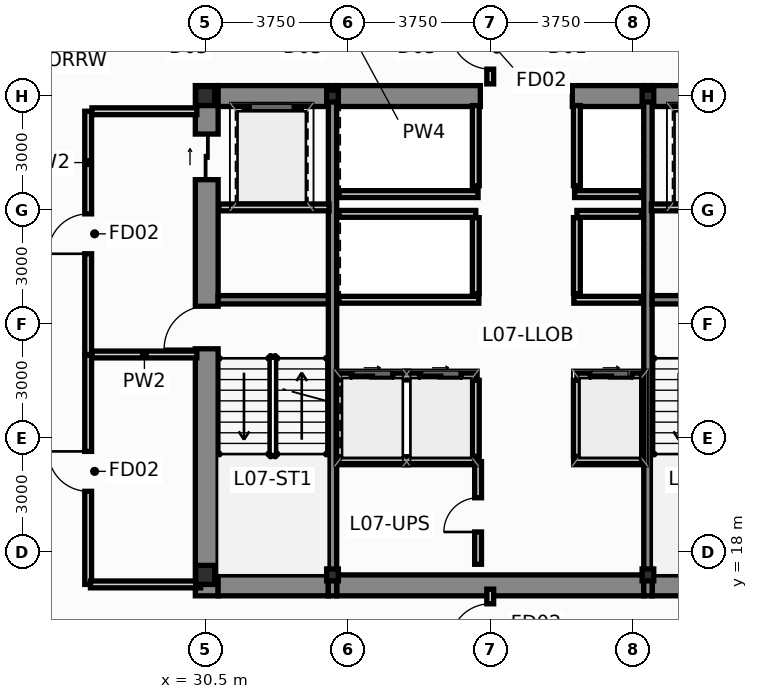
"""IFC4 building model, lengths in metres.
Left out: names, types, materials, properties, quantities, classifications, styles, units other than length and angle.
Written with IfcOpenShell. Run it as: python <this file> out.ifc"""

import sys

from ifc_helpers import new_model, si_unit, direction, frame, frame_2d, origin, origin_2d, place, context, subcontext, project, spatial, rectangle, i_section, extrude, source, transform, mapped, element, fill, save


model = new_model("IFC4")
c1 = context("Model", 3, precision=1e-05, world=origin(), true_north=direction((0.0, 1.0)))
c2 = subcontext(c1, "Body", "Model", "MODEL_VIEW")
j1 = project(units=[si_unit("LENGTHUNIT", "METRE"), si_unit("PLANEANGLEUNIT", "RADIAN")], contexts=[c1])
p1 = place(None, origin())
s1 = spatial("IfcSite", under=j1, at=p1, CompositionType="ELEMENT")
p2 = place(p1, origin())
s2 = spatial("IfcBuilding", under=s1, at=p2, CompositionType="ELEMENT")
p3 = place(p2, frame((0.0, 0.0, 31.25)))
s3 = spatial("IfcBuildingStorey", under=s2, at=p3, CompositionType="ELEMENT", Elevation=31.25)
m1 = source(origin(), c2, "Body", "SweptSolid", [
    extrude(i_section(OverallWidth=0.5, OverallDepth=0.5, WebThickness=0.028, FlangeThickness=0.04, at=origin_2d()), origin(), (0.0, 0.0, 1.0), 3.65),
])
for number, where, z_axis, x_axis in (
    (1, (30.5, 17.4, 0.0), (0.0, 0.0, 1.0), (1.0, 0.0, 0.0)),
    (2, (30.5, 30.0, 0.0), (0.0, 0.0, 1.0), (1.0, 0.0, 0.0)),
):
    element("IfcColumn", number, at=place(p3, frame(where, z_axis=z_axis, x_axis=x_axis)), inside=s3, PredefinedType="COLUMN", context=c2, shape_type="MappedRepresentation", body=[
        mapped(m1, transform((0.0, 0.0, 0.0), scale=1.0)),
    ])
m2 = source(origin(), c2, "Body", "SweptSolid", [
    extrude(i_section(OverallWidth=0.307, OverallDepth=0.315, WebThickness=0.012, FlangeThickness=0.019, at=origin_2d()), origin(), (0.0, 0.0, 1.0), 3.65),
])
for number, where, z_axis, x_axis in (
    (3, (33.85, 17.4, 0.0), (0.0, 0.0, 1.0), (1.0, 0.0, 0.0)),
    (4, (42.15, 17.4, 0.0), (0.0, 0.0, 1.0), (1.0, 0.0, 0.0)),
    (5, (33.85, 30.0, 0.0), (0.0, 0.0, 1.0), (1.0, 0.0, 0.0)),
    (6, (42.15, 30.0, 0.0), (0.0, 0.0, 1.0), (1.0, 0.0, 0.0)),
):
    element("IfcColumn", number, at=place(p3, frame(where, z_axis=z_axis, x_axis=x_axis)), inside=s3, PredefinedType="COLUMN", context=c2, shape_type="MappedRepresentation", body=[
        mapped(m2, transform((0.0, 0.0, 0.0), scale=1.0)),
    ])
p4 = place(p3, frame((30.54, 16.85, 0.0), z_axis=(0.0, 0.0, 1.0), x_axis=(0.0, 1.0, 0.0)))
e7 = element("IfcWall", 7, at=p4, inside=s3, PredefinedType="SHEAR", context=c2, shape_type="SweptSolid", body=[
    extrude(rectangle(XDim=13.425, YDim=0.6, at=frame_2d((6.712, 0.0))), origin(), (0.0, 0.0, 1.0), 3.65),
])
p5 = place(p4, frame((6.5, 0.0, 0.0)))
e8 = element("IfcOpeningElement", 8, at=p5, cuts=e7, PredefinedType="OPENING", context=c2, shape_type="SweptSolid", body=[
    extrude(rectangle(XDim=1.12, YDim=2.15, at=frame_2d((0.56, 1.075))), frame((0.0, 0.312, 0.0), z_axis=(0.0, -1.0, 0.0), x_axis=(1.0, 0.0, 0.0)), (0.0, 0.0, 1.0), 0.624),
])
p6 = place(p4, frame((10.95, 0.0, 0.0)))
e9 = element("IfcOpeningElement", 9, at=p6, cuts=e7, PredefinedType="OPENING", context=c2, shape_type="SweptSolid", body=[
    extrude(rectangle(XDim=1.2, YDim=2.2, at=frame_2d((0.6, 1.1))), frame((0.0, 0.312, 0.0), z_axis=(0.0, -1.0, 0.0), x_axis=(1.0, 0.0, 0.0)), (0.0, 0.0, 1.0), 0.624),
])
p7 = place(p3, frame((30.84, 17.125, 0.0), z_axis=(0.0, 0.0, 1.0), x_axis=(1.0, 0.0, 0.0)))
e10 = element("IfcWall", 10, at=p7, inside=s3, PredefinedType="SHEAR", context=c2, shape_type="SweptSolid", body=[
    extrude(rectangle(XDim=2.9, YDim=0.55, at=frame_2d((1.45, 0.0))), origin(), (0.0, 0.0, 1.0), 3.65),
])
p8 = place(p3, frame((33.96, 17.125, 0.0), z_axis=(0.0, 0.0, 1.0), x_axis=(1.0, 0.0, 0.0)))
e11 = element("IfcWall", 11, at=p8, inside=s3, PredefinedType="SHEAR", context=c2, shape_type="SweptSolid", body=[
    extrude(rectangle(XDim=8.08, YDim=0.55, at=frame_2d((4.04, 0.0))), origin(), (0.0, 0.0, 1.0), 3.65),
])
for number, where, z_axis, x_axis in (
    (12, (42.26, 17.125, 0.0), (0.0, 0.0, 1.0), (1.0, 0.0, 0.0)),
    (13, (30.84, 30.0, 0.0), (0.0, 0.0, 1.0), (1.0, 0.0, 0.0)),
):
    element("IfcWall", number, at=place(p3, frame(where, z_axis=z_axis, x_axis=x_axis)), inside=s3, PredefinedType="SHEAR", context=c2, shape_type="SweptSolid", body=[
        extrude(rectangle(XDim=2.9, YDim=0.55, at=frame_2d((1.45, 0.0))), origin(), (0.0, 0.0, 1.0), 3.65),
    ])
p9 = place(p3, frame((33.96, 30.0, 0.0), z_axis=(0.0, 0.0, 1.0), x_axis=(1.0, 0.0, 0.0)))
e14 = element("IfcWall", 14, at=p9, inside=s3, PredefinedType="SHEAR", context=c2, shape_type="SweptSolid", body=[
    extrude(rectangle(XDim=3.78, YDim=0.55, at=frame_2d((1.89, 0.0))), origin(), (0.0, 0.0, 1.0), 3.65),
])
p10 = place(p3, frame((40.16, 30.0, 0.0), z_axis=(0.0, 0.0, 1.0), x_axis=(1.0, 0.0, 0.0)))
e15 = element("IfcWall", 15, at=p10, inside=s3, PredefinedType="SHEAR", context=c2, shape_type="SweptSolid", body=[
    extrude(rectangle(XDim=1.88, YDim=0.55, at=frame_2d((0.94, 0.0))), origin(), (0.0, 0.0, 1.0), 3.65),
])
p11 = place(p3, frame((42.26, 30.0, 0.0), z_axis=(0.0, 0.0, 1.0), x_axis=(1.0, 0.0, 0.0)))
e16 = element("IfcWall", 16, at=p11, inside=s3, PredefinedType="SHEAR", context=c2, shape_type="SweptSolid", body=[
    extrude(rectangle(XDim=2.9, YDim=0.55, at=frame_2d((1.45, 0.0))), origin(), (0.0, 0.0, 1.0), 3.65),
])
for number, where, z_axis, x_axis in (
    (17, (33.85, 16.85, 0.0), (0.0, 0.0, 1.0), (0.0, 1.0, 0.0)),
    (18, (42.15, 16.85, 0.0), (0.0, 0.0, 1.0), (0.0, 1.0, 0.0)),
):
    element("IfcWall", number, at=place(p3, frame(where, z_axis=z_axis, x_axis=x_axis)), inside=s3, PredefinedType="SHEAR", context=c2, shape_type="SweptSolid", body=[
        extrude(rectangle(XDim=13.425, YDim=0.22, at=frame_2d((6.712, 0.0))), origin(), (0.0, 0.0, 1.0), 3.65),
    ])
for number, where, z_axis, x_axis in (
    (19, (30.84, 24.64, 0.0), (0.0, 0.0, 1.0), (1.0, 0.0, 0.0)),
    (20, (42.26, 24.64, 0.0), (0.0, 0.0, 1.0), (1.0, 0.0, 0.0)),
):
    element("IfcWall", number, at=place(p3, frame(where, z_axis=z_axis, x_axis=x_axis)), inside=s3, PredefinedType="SHEAR", context=c2, shape_type="SweptSolid", body=[
        extrude(rectangle(XDim=2.9, YDim=0.22, at=frame_2d((1.45, 0.0))), origin(), (0.0, 0.0, 1.0), 3.65),
    ])
p12 = place(p3, frame((34.02, 22.62, 0.0), z_axis=(0.0, 0.0, 1.0), x_axis=(1.0, 0.0, 0.0)))
e21 = element("IfcWall", 21, at=p12, inside=s3, PredefinedType="PARTITIONING", context=c2, shape_type="SweptSolid", body=[
    extrude(rectangle(XDim=3.6, YDim=0.18, at=frame_2d((1.8, 0.0))), origin(), (0.0, 0.0, 1.0), 3.4),
])
p13 = place(p12, frame((0.32, 0.0, 0.0)))
e22 = element("IfcOpeningElement", 22, at=p13, cuts=e21, PredefinedType="OPENING", context=c2, shape_type="SweptSolid", body=[
    extrude(rectangle(XDim=1.1, YDim=2.2, at=frame_2d((0.55, 1.1))), frame((0.0, 0.102, 0.0), z_axis=(0.0, -1.0, 0.0), x_axis=(1.0, 0.0, 0.0)), (0.0, 0.0, 1.0), 0.204),
])
p14 = place(p12, frame((2.12, 0.0, 0.0)))
e23 = element("IfcOpeningElement", 23, at=p14, cuts=e21, PredefinedType="OPENING", context=c2, shape_type="SweptSolid", body=[
    extrude(rectangle(XDim=1.1, YDim=2.2, at=frame_2d((0.55, 1.1))), frame((0.0, 0.102, 0.0), z_axis=(0.0, -1.0, 0.0), x_axis=(1.0, 0.0, 0.0)), (0.0, 0.0, 1.0), 0.204),
])
p15 = place(p3, frame((40.28, 22.62, 0.0), z_axis=(0.0, 0.0, 1.0), x_axis=(1.0, 0.0, 0.0)))
e24 = element("IfcWall", 24, at=p15, inside=s3, PredefinedType="PARTITIONING", context=c2, shape_type="SweptSolid", body=[
    extrude(rectangle(XDim=1.7, YDim=0.18, at=frame_2d((0.85, 0.0))), origin(), (0.0, 0.0, 1.0), 3.4),
])
p16 = place(p15, frame((0.35, 0.0, 0.0)))
e25 = element("IfcOpeningElement", 25, at=p16, cuts=e24, PredefinedType="OPENING", context=c2, shape_type="SweptSolid", body=[
    extrude(rectangle(XDim=1.1, YDim=2.2, at=frame_2d((0.55, 1.1))), frame((0.0, 0.102, 0.0), z_axis=(0.0, -1.0, 0.0), x_axis=(1.0, 0.0, 0.0)), (0.0, 0.0, 1.0), 0.204),
])
for number, where, z_axis, x_axis in (
    (26, (37.62, 20.52, 0.0), (0.0, 0.0, 1.0), (0.0, 1.0, 0.0)),
    (27, (40.28, 20.52, 0.0), (0.0, 0.0, 1.0), (0.0, 1.0, 0.0)),
):
    element("IfcWall", number, at=place(p3, frame(where, z_axis=z_axis, x_axis=x_axis)), inside=s3, PredefinedType="PARTITIONING", context=c2, shape_type="SweptSolid", body=[
        extrude(rectangle(XDim=2.0, YDim=0.18, at=frame_2d((1.0, 0.0))), origin(), (0.0, 0.0, 1.0), 3.4),
    ])
p17 = place(p3, frame((34.02, 26.9, 0.0), z_axis=(0.0, 0.0, 1.0), x_axis=(1.0, 0.0, 0.0)))
e28 = element("IfcWall", 28, at=p17, inside=s3, PredefinedType="PARTITIONING", context=c2, shape_type="SweptSolid", body=[
    extrude(rectangle(XDim=3.6, YDim=0.18, at=frame_2d((1.8, 0.0))), origin(), (0.0, 0.0, 1.0), 3.4),
])
p18 = place(p3, frame((40.28, 26.9, 0.0), z_axis=(0.0, 0.0, 1.0), x_axis=(1.0, 0.0, 0.0)))
e29 = element("IfcWall", 29, at=p18, inside=s3, PredefinedType="PARTITIONING", context=c2, shape_type="SweptSolid", body=[
    extrude(rectangle(XDim=1.7, YDim=0.18, at=frame_2d((0.85, 0.0))), origin(), (0.0, 0.0, 1.0), 3.4),
])
for number, where, z_axis, x_axis in (
    (30, (37.62, 24.8, 0.0), (0.0, 0.0, 1.0), (0.0, 1.0, 0.0)),
    (31, (40.28, 24.8, 0.0), (0.0, 0.0, 1.0), (0.0, 1.0, 0.0)),
):
    element("IfcWall", number, at=place(p3, frame(where, z_axis=z_axis, x_axis=x_axis)), inside=s3, PredefinedType="PARTITIONING", context=c2, shape_type="SweptSolid", body=[
        extrude(rectangle(XDim=2.0, YDim=0.18, at=frame_2d((1.0, 0.0))), origin(), (0.0, 0.0, 1.0), 3.4),
    ])
p19 = place(p3, frame((34.02, 24.64, 0.0), z_axis=(0.0, 0.0, 1.0), x_axis=(1.0, 0.0, 0.0)))
e32 = element("IfcWall", 32, at=p19, inside=s3, PredefinedType="PARTITIONING", context=c2, shape_type="SweptSolid", body=[
    extrude(rectangle(XDim=3.68, YDim=0.18, at=frame_2d((1.84, 0.0))), origin(), (0.0, 0.0, 1.0), 3.4),
])
p20 = place(p3, frame((40.2, 24.64, 0.0), z_axis=(0.0, 0.0, 1.0), x_axis=(1.0, 0.0, 0.0)))
e33 = element("IfcWall", 33, at=p20, inside=s3, PredefinedType="PARTITIONING", context=c2, shape_type="SweptSolid", body=[
    extrude(rectangle(XDim=1.78, YDim=0.18, at=frame_2d((0.89, 0.0))), origin(), (0.0, 0.0, 1.0), 3.4),
])
p21 = place(p3, frame((34.02, 27.42, 0.0), z_axis=(0.0, 0.0, 1.0), x_axis=(1.0, 0.0, 0.0)))
e34 = element("IfcWall", 34, at=p21, inside=s3, PredefinedType="PARTITIONING", context=c2, shape_type="SweptSolid", body=[
    extrude(rectangle(XDim=3.66, YDim=0.18, at=frame_2d((1.83, 0.0))), origin(), (0.0, 0.0, 1.0), 3.4),
])
p22 = place(p3, frame((40.22, 27.42, 0.0), z_axis=(0.0, 0.0, 1.0), x_axis=(1.0, 0.0, 0.0)))
e35 = element("IfcWall", 35, at=p22, inside=s3, PredefinedType="PARTITIONING", context=c2, shape_type="SweptSolid", body=[
    extrude(rectangle(XDim=1.76, YDim=0.18, at=frame_2d((0.88, 0.0))), origin(), (0.0, 0.0, 1.0), 3.4),
])
for number, where, z_axis, x_axis in (
    (36, (37.62, 27.64, 0.0), (0.0, 0.0, 1.0), (0.0, 1.0, 0.0)),
    (37, (40.28, 27.64, 0.0), (0.0, 0.0, 1.0), (0.0, 1.0, 0.0)),
):
    element("IfcWall", number, at=place(p3, frame(where, z_axis=z_axis, x_axis=x_axis)), inside=s3, PredefinedType="PARTITIONING", context=c2, shape_type="SweptSolid", body=[
        extrude(rectangle(XDim=2.11, YDim=0.18, at=frame_2d((1.055, 0.0))), origin(), (0.0, 0.0, 1.0), 3.4),
    ])
p23 = place(p3, frame((27.42, 23.2, 0.0), z_axis=(0.0, 0.0, 1.0), x_axis=(0.0, 1.0, 0.0)))
e38 = element("IfcWall", 38, at=p23, inside=s3, PredefinedType="PARTITIONING", context=c2, shape_type="SweptSolid", body=[
    extrude(rectangle(XDim=6.4, YDim=0.18, at=frame_2d((3.2, 0.0))), origin(), (0.0, 0.0, 1.0), 3.4),
])
p24 = place(p23, frame((2.65, 0.0, 0.0)))
e39 = element("IfcOpeningElement", 39, at=p24, cuts=e38, PredefinedType="OPENING", context=c2, shape_type="SweptSolid", body=[
    extrude(rectangle(XDim=1.05, YDim=2.15, at=frame_2d((0.525, 1.075))), frame((0.0, 0.102, 0.0), z_axis=(0.0, -1.0, 0.0), x_axis=(1.0, 0.0, 0.0)), (0.0, 0.0, 1.0), 0.204),
])
p25 = place(p3, frame((27.52, 23.2, 0.0), z_axis=(0.0, 0.0, 1.0), x_axis=(1.0, 0.0, 0.0)))
e40 = element("IfcWall", 40, at=p25, inside=s3, PredefinedType="PARTITIONING", context=c2, shape_type="SweptSolid", body=[
    extrude(rectangle(XDim=2.76, YDim=0.18, at=frame_2d((1.38, 0.0))), origin(), (0.0, 0.0, 1.0), 3.4),
])
p26 = place(p3, frame((27.52, 29.6, 0.0), z_axis=(0.0, 0.0, 1.0), x_axis=(1.0, 0.0, 0.0)))
e41 = element("IfcWall", 41, at=p26, inside=s3, PredefinedType="PARTITIONING", context=c2, shape_type="SweptSolid", body=[
    extrude(rectangle(XDim=2.76, YDim=0.18, at=frame_2d((1.38, 0.0))), origin(), (0.0, 0.0, 1.0), 2.783),
])
for number, where, z_axis, x_axis in (
    (42, (30.86, 27.07, 0.0), (0.0, 0.0, 1.0), (1.0, 0.0, 0.0)),
    (43, (42.24, 27.07, 0.0), (0.0, 0.0, 1.0), (1.0, 0.0, 0.0)),
):
    element("IfcWall", number, at=place(p3, frame(where, z_axis=z_axis, x_axis=x_axis)), inside=s3, PredefinedType="PARTITIONING", context=c2, shape_type="SweptSolid", body=[
        extrude(rectangle(XDim=2.9, YDim=0.18, at=frame_2d((1.45, 0.0))), origin(), (0.0, 0.0, 1.0), 3.4),
    ])
p27 = place(p3, frame((34.02, 20.42, 0.0), z_axis=(0.0, 0.0, 1.0), x_axis=(1.0, 0.0, 0.0)))
e44 = element("IfcWall", 44, at=p27, inside=s3, PredefinedType="PARTITIONING", context=c2, shape_type="SweptSolid", body=[
    extrude(rectangle(XDim=3.64, YDim=0.18, at=frame_2d((1.82, 0.0))), origin(), (0.0, 0.0, 1.0), 3.4),
])
p28 = place(p3, frame((40.22, 20.42, 0.0), z_axis=(0.0, 0.0, 1.0), x_axis=(1.0, 0.0, 0.0)))
e45 = element("IfcWall", 45, at=p28, inside=s3, PredefinedType="PARTITIONING", context=c2, shape_type="SweptSolid", body=[
    extrude(rectangle(XDim=1.76, YDim=0.18, at=frame_2d((0.88, 0.0))), origin(), (0.0, 0.0, 1.0), 3.4),
])
p29 = place(p3, frame((37.68, 17.68, 0.0), z_axis=(0.0, 0.0, 1.0), x_axis=(0.0, 1.0, 0.0)))
e46 = element("IfcWall", 46, at=p29, inside=s3, PredefinedType="PARTITIONING", context=c2, shape_type="SweptSolid", body=[
    extrude(rectangle(XDim=2.7, YDim=0.18, at=frame_2d((1.35, 0.0))), origin(), (0.0, 0.0, 1.0), 3.4),
])
p30 = place(p29, frame((0.85, 0.0, 0.0)))
e47 = element("IfcOpeningElement", 47, at=p30, cuts=e46, PredefinedType="OPENING", context=c2, shape_type="SweptSolid", body=[
    extrude(rectangle(XDim=0.9, YDim=2.1, at=frame_2d((0.45, 1.05))), frame((0.0, 0.102, 0.0), z_axis=(0.0, -1.0, 0.0), x_axis=(1.0, 0.0, 0.0)), (0.0, 0.0, 1.0), 0.204),
])
p31 = place(p3, frame((27.42, 17.15, 0.0), z_axis=(0.0, 0.0, 1.0), x_axis=(0.0, 1.0, 0.0)))
e48 = element("IfcWall", 48, at=p31, inside=s3, PredefinedType="PARTITIONING", context=c2, shape_type="SweptSolid", body=[
    extrude(rectangle(XDim=6.03, YDim=0.18, at=frame_2d((3.015, 0.0))), origin(), (0.0, 0.0, 1.0), 3.026),
])
p32 = place(p31, frame((2.45, 0.0, 0.0)))
e49 = element("IfcOpeningElement", 49, at=p32, cuts=e48, PredefinedType="OPENING", context=c2, shape_type="SweptSolid", body=[
    extrude(rectangle(XDim=1.05, YDim=2.15, at=frame_2d((0.525, 1.075))), frame((0.0, 0.102, 0.0), z_axis=(0.0, -1.0, 0.0), x_axis=(1.0, 0.0, 0.0)), (0.0, 0.0, 1.0), 0.204),
])
p33 = place(p3, frame((27.48, 17.15, 0.0), z_axis=(0.0, 0.0, 1.0), x_axis=(1.0, 0.0, 0.0)))
e50 = element("IfcWall", 50, at=p33, inside=s3, PredefinedType="PARTITIONING", context=c2, shape_type="SweptSolid", body=[
    extrude(rectangle(XDim=2.9, YDim=0.18, at=frame_2d((1.45, 0.0))), origin(), (0.0, 0.0, 1.0), 2.783),
])
p34 = place(p3, frame((38.0, 15.205, 0.0), z_axis=(0.0, 0.0, 1.0), x_axis=(0.0, 1.0, 0.0)))
e51 = element("IfcWall", 51, at=p34, inside=s3, PredefinedType="PARTITIONING", context=c2, shape_type="SweptSolid", body=[
    extrude(rectangle(XDim=1.82, YDim=0.18, at=frame_2d((0.91, 0.0))), origin(), (0.0, 0.0, 1.0), 3.4),
])
p35 = place(p34, frame((0.385, 0.0, 0.0)))
e52 = element("IfcOpeningElement", 52, at=p35, cuts=e51, PredefinedType="OPENING", context=c2, shape_type="SweptSolid", body=[
    extrude(rectangle(XDim=1.05, YDim=2.15, at=frame_2d((0.525, 1.075))), frame((0.0, 0.102, 0.0), z_axis=(0.0, -1.0, 0.0), x_axis=(1.0, 0.0, 0.0)), (0.0, 0.0, 1.0), 0.204),
])
p36 = place(p3, frame((38.0, 30.32, 0.0), z_axis=(0.0, 0.0, 1.0), x_axis=(0.0, 1.0, 0.0)))
e53 = element("IfcWall", 53, at=p36, inside=s3, PredefinedType="PARTITIONING", context=c2, shape_type="SweptSolid", body=[
    extrude(rectangle(XDim=1.825, YDim=0.18, at=frame_2d((0.913, 0.0))), origin(), (0.0, 0.0, 1.0), 3.4),
])
p37 = place(p36, frame((0.388, 0.0, 0.0)))
e54 = element("IfcOpeningElement", 54, at=p37, cuts=e53, PredefinedType="OPENING", context=c2, shape_type="SweptSolid", body=[
    extrude(rectangle(XDim=1.05, YDim=2.15, at=frame_2d((0.525, 1.075))), frame((0.0, 0.102, 0.0), z_axis=(0.0, -1.0, 0.0), x_axis=(1.0, 0.0, 0.0)), (0.0, 0.0, 1.0), 0.204),
])
p38 = place(p5, origin())
e55 = element("IfcDoor", 55, at=p38, inside=s3, OperationType="SINGLE_SWING_LEFT", PredefinedType="DOOR", context=c2, shape_type="SweptSolid", body=[
    extrude(rectangle(XDim=1.12, YDim=2.15, at=frame_2d((0.56, 1.075))), frame((0.0, 0.025, 0.0), z_axis=(0.0, -1.0, 0.0), x_axis=(1.0, 0.0, 0.0)), (0.0, 0.0, 1.0), 0.05),
])
fill(e8, e55)
p39 = place(p6, origin())
e56 = element("IfcDoor", 56, at=p39, inside=s3, OperationType="SLIDING_TO_LEFT", PredefinedType="DOOR", context=c2, shape_type="SweptSolid", body=[
    extrude(rectangle(XDim=1.2, YDim=2.2, at=frame_2d((0.6, 1.1))), frame((0.0, 0.025, 0.0), z_axis=(0.0, -1.0, 0.0), x_axis=(1.0, 0.0, 0.0)), (0.0, 0.0, 1.0), 0.05),
])
fill(e9, e56)
p40 = place(p13, origin())
e57 = element("IfcDoor", 57, at=p40, inside=s3, OperationType="SLIDING_TO_LEFT", PredefinedType="DOOR", context=c2, shape_type="SweptSolid", body=[
    extrude(rectangle(XDim=1.1, YDim=2.2, at=frame_2d((0.55, 1.1))), frame((0.0, 0.025, 0.0), z_axis=(0.0, -1.0, 0.0), x_axis=(1.0, 0.0, 0.0)), (0.0, 0.0, 1.0), 0.05),
])
fill(e22, e57)
p41 = place(p14, origin())
e58 = element("IfcDoor", 58, at=p41, inside=s3, OperationType="SLIDING_TO_RIGHT", PredefinedType="DOOR", context=c2, shape_type="SweptSolid", body=[
    extrude(rectangle(XDim=1.1, YDim=2.2, at=frame_2d((0.55, 1.1))), frame((0.0, 0.025, 0.0), z_axis=(0.0, -1.0, 0.0), x_axis=(1.0, 0.0, 0.0)), (0.0, 0.0, 1.0), 0.05),
])
fill(e23, e58)
p42 = place(p16, origin())
e59 = element("IfcDoor", 59, at=p42, inside=s3, OperationType="SLIDING_TO_LEFT", PredefinedType="DOOR", context=c2, shape_type="SweptSolid", body=[
    extrude(rectangle(XDim=1.1, YDim=2.2, at=frame_2d((0.55, 1.1))), frame((0.0, 0.025, 0.0), z_axis=(0.0, -1.0, 0.0), x_axis=(1.0, 0.0, 0.0)), (0.0, 0.0, 1.0), 0.05),
])
fill(e25, e59)
p43 = place(p24, origin())
e60 = element("IfcDoor", 60, at=p43, inside=s3, OperationType="SINGLE_SWING_LEFT", PredefinedType="DOOR", context=c2, shape_type="SweptSolid", body=[
    extrude(rectangle(XDim=1.05, YDim=2.15, at=frame_2d((0.525, 1.075))), frame((0.0, 0.025, 0.0), z_axis=(0.0, -1.0, 0.0), x_axis=(1.0, 0.0, 0.0)), (0.0, 0.0, 1.0), 0.05),
])
fill(e39, e60)
p44 = place(p30, origin())
e61 = element("IfcDoor", 61, at=p44, inside=s3, OperationType="SINGLE_SWING_LEFT", PredefinedType="DOOR", context=c2, shape_type="SweptSolid", body=[
    extrude(rectangle(XDim=0.9, YDim=2.1, at=frame_2d((0.45, 1.05))), frame((0.0, 0.025, 0.0), z_axis=(0.0, -1.0, 0.0), x_axis=(1.0, 0.0, 0.0)), (0.0, 0.0, 1.0), 0.05),
])
fill(e47, e61)
p45 = place(p32, origin())
e62 = element("IfcDoor", 62, at=p45, inside=s3, OperationType="SINGLE_SWING_RIGHT", PredefinedType="DOOR", context=c2, shape_type="SweptSolid", body=[
    extrude(rectangle(XDim=1.05, YDim=2.15, at=frame_2d((0.525, 1.075))), frame((0.0, 0.025, 0.0), z_axis=(0.0, -1.0, 0.0), x_axis=(1.0, 0.0, 0.0)), (0.0, 0.0, 1.0), 0.05),
])
fill(e49, e62)
p46 = place(p35, origin())
e63 = element("IfcDoor", 63, at=p46, inside=s3, OperationType="SINGLE_SWING_LEFT", PredefinedType="DOOR", context=c2, shape_type="SweptSolid", body=[
    extrude(rectangle(XDim=1.05, YDim=2.15, at=frame_2d((0.525, 1.075))), frame((0.0, 0.025, 0.0), z_axis=(0.0, -1.0, 0.0), x_axis=(1.0, 0.0, 0.0)), (0.0, 0.0, 1.0), 0.05),
])
fill(e52, e63)
p47 = place(p37, origin())
e64 = element("IfcDoor", 64, at=p47, inside=s3, OperationType="SINGLE_SWING_RIGHT", PredefinedType="DOOR", context=c2, shape_type="SweptSolid", body=[
    extrude(rectangle(XDim=1.05, YDim=2.15, at=frame_2d((0.525, 1.075))), frame((0.0, 0.025, 0.0), z_axis=(0.0, -1.0, 0.0), x_axis=(1.0, 0.0, 0.0)), (0.0, 0.0, 1.0), 0.05),
])
fill(e54, e64)
save(model, sys.argv[1])
